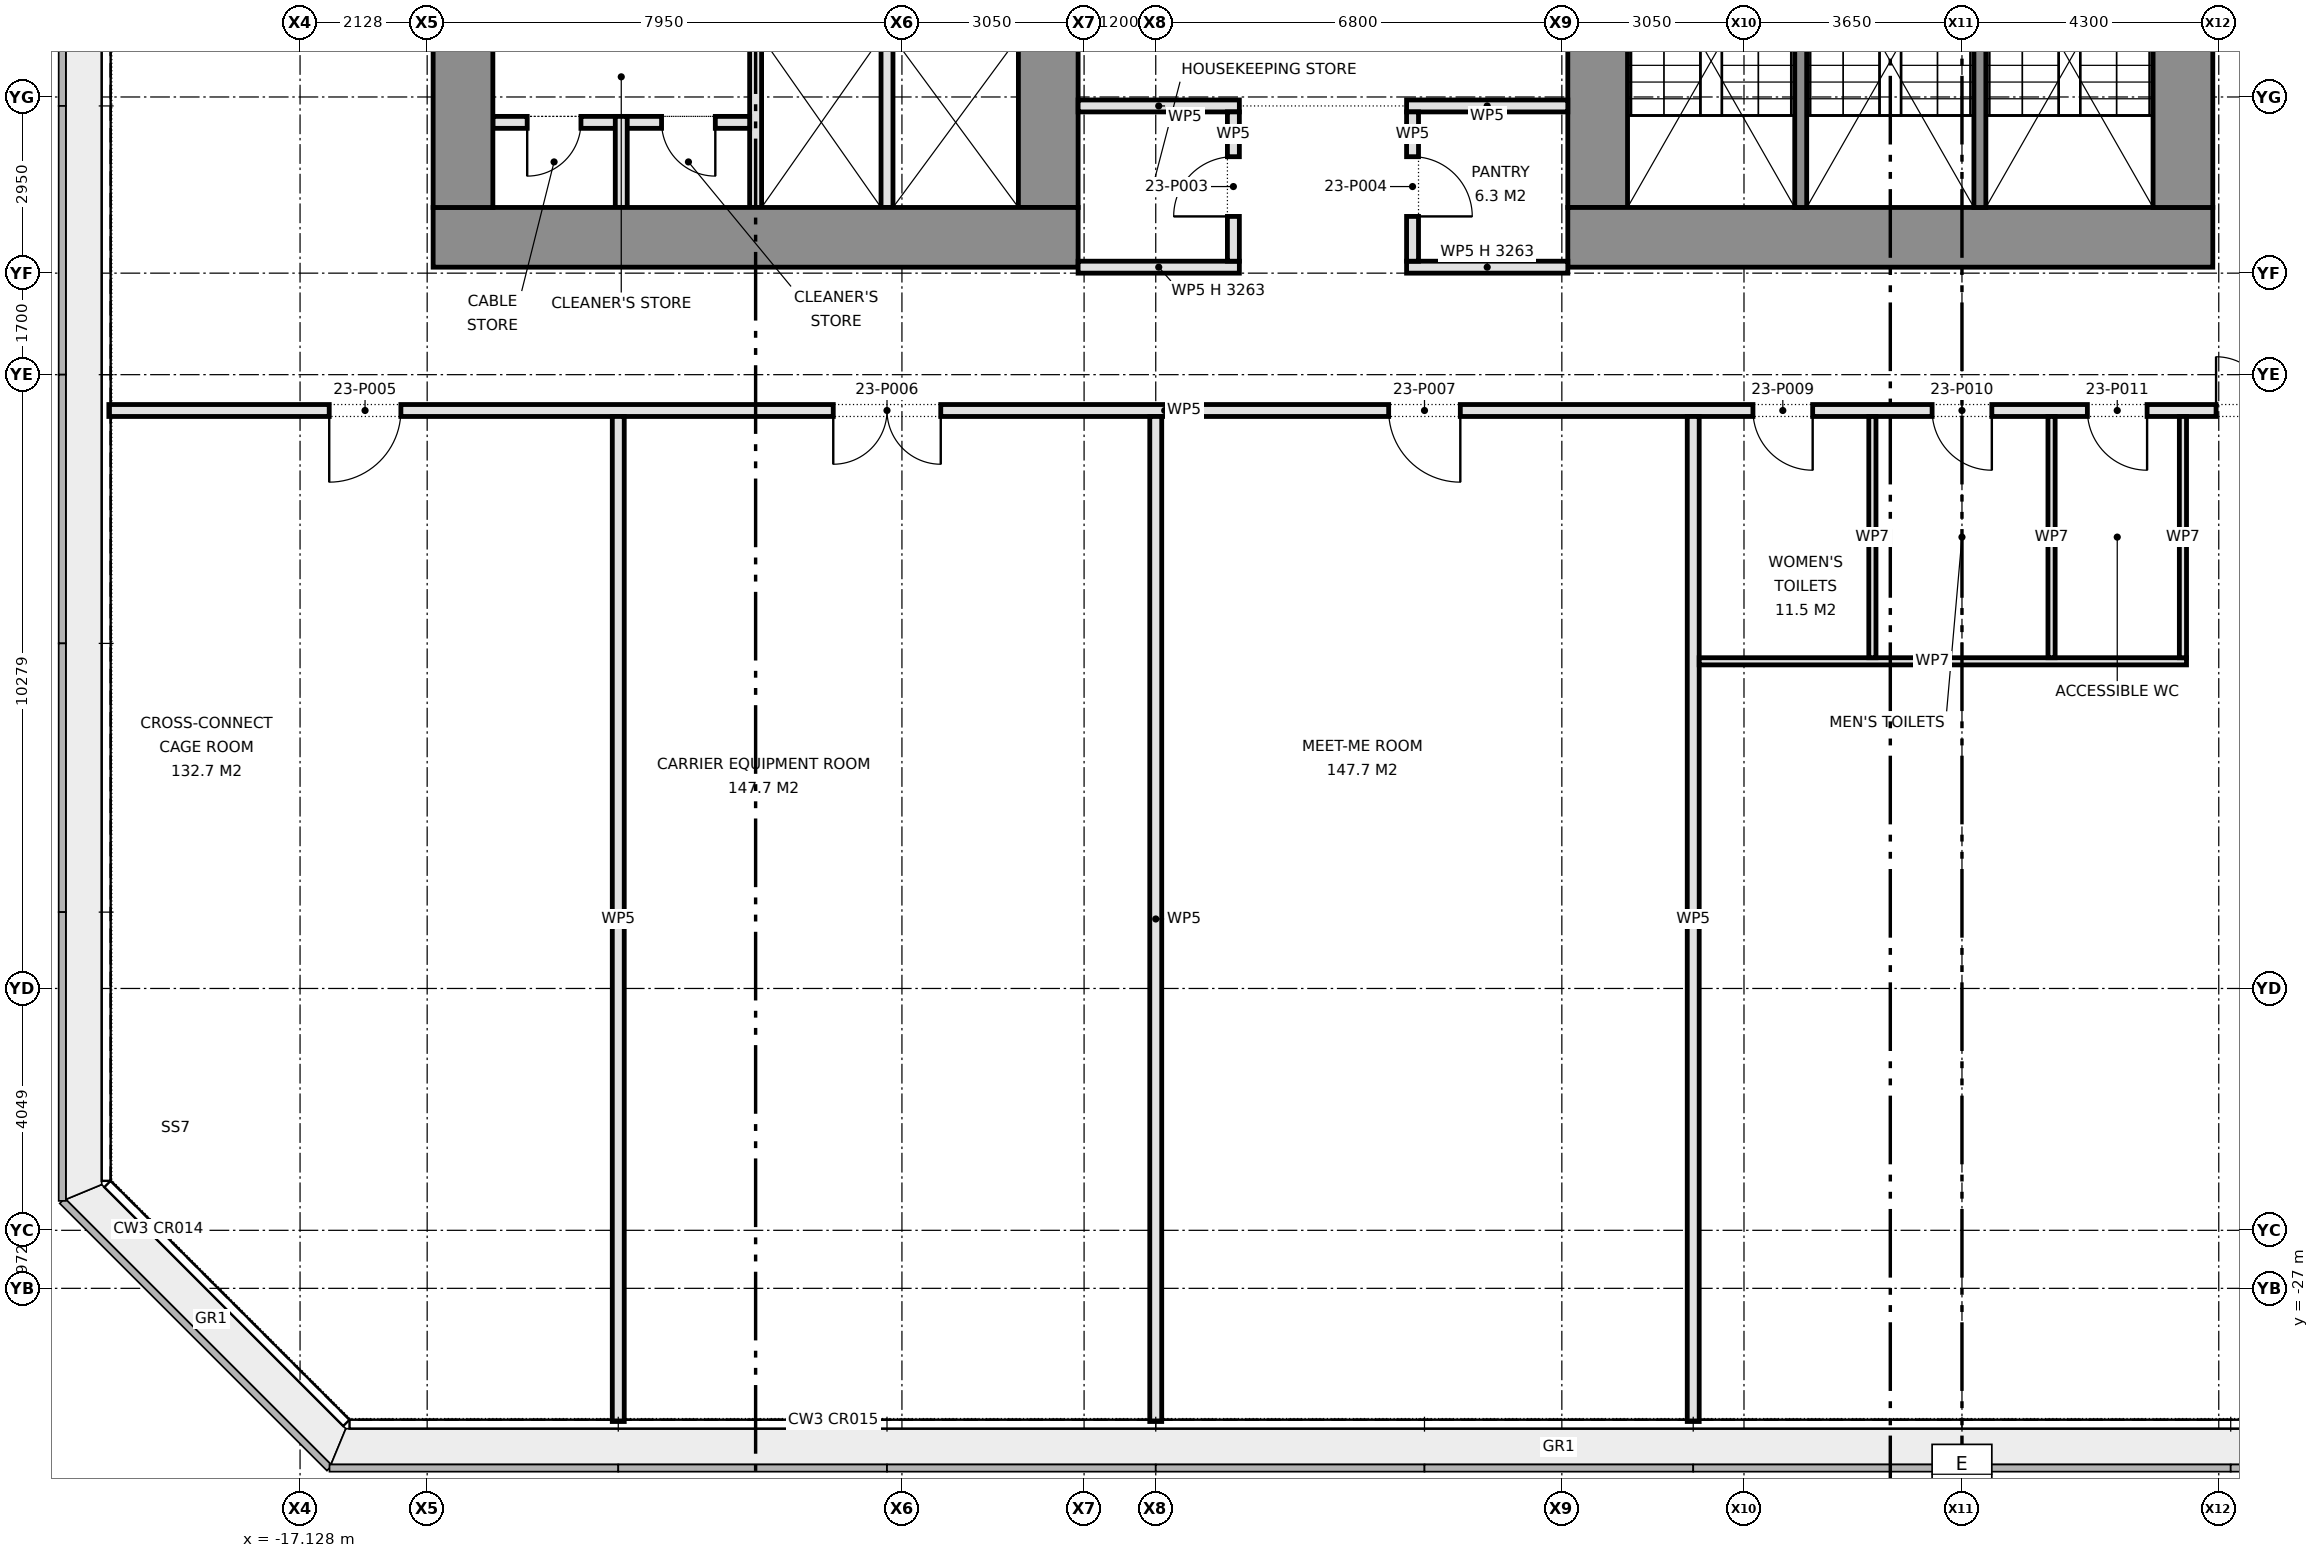
"""IFC4 building model, lengths in metres.
Left out: names, types, materials, properties, quantities, classifications, styles, units other than length and angle.
Written with IfcOpenShell. Run it as: python <this file> out.ifc"""

import sys

from ifc_helpers import new_model, si_unit, direction, frame, frame_2d, origin, place, context, subcontext, project, spatial, rectangle, extrude, element, fill, save


model = new_model("IFC4")
c1 = context("Model", 3, precision=1e-05, world=origin(), true_north=direction((0.0, 1.0)))
c2 = subcontext(c1, "Body", "Model", "MODEL_VIEW")
j1 = project(units=[si_unit("LENGTHUNIT", "METRE"), si_unit("PLANEANGLEUNIT", "RADIAN")], contexts=[c1])
p1 = place(None, origin())
s1 = spatial("IfcSite", under=j1, at=p1, CompositionType="ELEMENT")
p2 = place(p1, origin())
s2 = spatial("IfcBuilding", under=s1, at=p2, CompositionType="ELEMENT")
p3 = place(p2, frame((0.0, 0.0, 104.0)))
s3 = spatial("IfcBuildingStorey", under=s2, at=p3, CompositionType="ELEMENT", Elevation=104.0)
p4 = place(p3, frame((-14.9, -9.4, 0.0), z_axis=(0.0, 0.0, 1.0), x_axis=(1.0, 0.0, 0.0)))
e1 = element("IfcWall", 1, at=p4, inside=s3, PredefinedType="SHEAR", context=c2, shape_type="SweptSolid", body=[
    extrude(rectangle(XDim=10.8, YDim=1.0, at=frame_2d((5.4, 0.0))), origin(), (0.0, 0.0, 1.0), 4.2),
])
for number, where, z_axis, x_axis in (
    (2, (-14.4, -8.9, 0.0), (0.0, 0.0, 1.0), (0.0, 1.0, 0.0)),
    (3, (-4.6, -8.9, 0.0), (0.0, 0.0, 1.0), (0.0, 1.0, 0.0)),
):
    element("IfcWall", number, at=place(p3, frame(where, z_axis=z_axis, x_axis=x_axis)), inside=s3, PredefinedType="SHEAR", context=c2, shape_type="SweptSolid", body=[
        extrude(rectangle(XDim=3.15, YDim=1.0, at=frame_2d((1.575, 0.0))), origin(), (0.0, 0.0, 1.0), 4.2),
    ])
for number, where, z_axis, x_axis in (
    (4, (-9.5, -8.9, 0.0), (0.0, 0.0, 1.0), (0.0, 1.0, 0.0)),
    (5, (-7.3, -8.9, 0.0), (0.0, 0.0, 1.0), (0.0, 1.0, 0.0)),
):
    element("IfcWall", number, at=place(p3, frame(where, z_axis=z_axis, x_axis=x_axis)), inside=s3, PredefinedType="PARTITIONING", context=c2, shape_type="SweptSolid", body=[
        extrude(rectangle(XDim=2.85, YDim=0.2, at=frame_2d((1.425, 0.0))), origin(), (0.0, 0.0, 1.0), 4.2),
    ])
p5 = place(p3, frame((-13.9, -7.475, 0.0), z_axis=(0.0, 0.0, 1.0), x_axis=(1.0, 0.0, 0.0)))
e6 = element("IfcWall", 6, at=p5, inside=s3, PredefinedType="PARTITIONING", context=c2, shape_type="SweptSolid", body=[
    extrude(rectangle(XDim=4.3, YDim=0.2, at=frame_2d((2.15, 0.0))), origin(), (0.0, 0.0, 1.0), 4.2),
])
p6 = place(p5, frame((0.575, 0.0, 0.0)))
e7 = element("IfcOpeningElement", 7, at=p6, cuts=e6, PredefinedType="OPENING", context=c2, shape_type="SweptSolid", body=[
    extrude(rectangle(XDim=0.9, YDim=2.1, at=frame_2d((0.45, 1.05))), frame((0.0, 0.11, 0.0), z_axis=(0.0, -1.0, 0.0), x_axis=(1.0, 0.0, 0.0)), (0.0, 0.0, 1.0), 0.22),
])
p7 = place(p5, frame((2.825, 0.0, 0.0)))
e8 = element("IfcOpeningElement", 8, at=p7, cuts=e6, PredefinedType="OPENING", context=c2, shape_type="SweptSolid", body=[
    extrude(rectangle(XDim=0.9, YDim=2.1, at=frame_2d((0.45, 1.05))), frame((0.0, 0.11, 0.0), z_axis=(0.0, -1.0, 0.0), x_axis=(1.0, 0.0, 0.0)), (0.0, 0.0, 1.0), 0.22),
])
p8 = place(p3, frame((-11.75, -8.9, 0.0), z_axis=(0.0, 0.0, 1.0), x_axis=(0.0, 1.0, 0.0)))
e9 = element("IfcWall", 9, at=p8, inside=s3, PredefinedType="PARTITIONING", context=c2, shape_type="SweptSolid", body=[
    extrude(rectangle(XDim=1.525, YDim=0.2, at=frame_2d((0.762, 0.0))), origin(), (0.0, 0.0, 1.0), 4.2),
])
p9 = place(p3, frame((14.9, -9.4, 0.0), z_axis=(0.0, 0.0, 1.0), x_axis=(-1.0, 0.0, 0.0)))
e10 = element("IfcWall", 10, at=p9, inside=s3, PredefinedType="SHEAR", context=c2, shape_type="SweptSolid", body=[
    extrude(rectangle(XDim=10.8, YDim=1.0, at=frame_2d((5.4, 0.0))), origin(), (0.0, 0.0, 1.0), 4.2),
])
p10 = place(p3, frame((14.4, -3.68, 0.0), z_axis=(0.0, 0.0, 1.0), x_axis=(0.0, -1.0, 0.0)))
e11 = element("IfcWall", 11, at=p10, inside=s3, PredefinedType="SHEAR", context=c2, shape_type="SweptSolid", body=[
    extrude(rectangle(XDim=5.22, YDim=1.0, at=frame_2d((2.61, 0.0))), origin(), (0.0, 0.0, 1.0), 4.2),
])
p11 = place(p3, frame((4.6, -1.55, 0.0), z_axis=(0.0, 0.0, 1.0), x_axis=(0.0, -1.0, 0.0)))
e12 = element("IfcWall", 12, at=p11, inside=s3, PredefinedType="SHEAR", context=c2, shape_type="SweptSolid", body=[
    extrude(rectangle(XDim=7.35, YDim=1.0, at=frame_2d((3.675, 0.0))), origin(), (0.0, 0.0, 1.0), 4.2),
])
for number, where, z_axis, x_axis in (
    (13, (11.0, -2.38, 0.0), (0.0, 0.0, 1.0), (0.0, -1.0, 0.0)),
    (14, (8.0, -2.38, 0.0), (0.0, 0.0, 1.0), (0.0, -1.0, 0.0)),
):
    element("IfcWall", number, at=place(p3, frame(where, z_axis=z_axis, x_axis=x_axis)), inside=s3, PredefinedType="SHEAR", context=c2, shape_type="SweptSolid", body=[
        extrude(rectangle(XDim=6.52, YDim=0.2, at=frame_2d((3.26, 0.0))), origin(), (0.0, 0.0, 1.0), 4.2),
    ])
p12 = place(p3, frame((-20.33, -12.3, 0.0), z_axis=(0.0, 0.0, 1.0), x_axis=(1.0, 0.0, 0.0)))
e15 = element("IfcWall", 15, at=p12, inside=s3, PredefinedType="PARTITIONING", context=c2, shape_type="SweptSolid", body=[
    extrude(rectangle(XDim=37.73, YDim=0.2, at=frame_2d((18.865, 0.0))), origin(), (0.0, 0.0, 1.0), 4.2),
])
p13 = place(p12, frame((3.69, 0.0, 0.0)))
e16 = element("IfcOpeningElement", 16, at=p13, cuts=e15, PredefinedType="OPENING", context=c2, shape_type="SweptSolid", body=[
    extrude(rectangle(XDim=1.2, YDim=2.1, at=frame_2d((0.6, 1.05))), frame((0.0, 0.11, 0.0), z_axis=(0.0, -1.0, 0.0), x_axis=(1.0, 0.0, 0.0)), (0.0, 0.0, 1.0), 0.22),
])
p14 = place(p12, frame((12.13, 0.0, 0.0)))
e17 = element("IfcOpeningElement", 17, at=p14, cuts=e15, PredefinedType="OPENING", context=c2, shape_type="SweptSolid", body=[
    extrude(rectangle(XDim=1.8, YDim=2.1, at=frame_2d((0.9, 1.05))), frame((0.0, 0.11, 0.0), z_axis=(0.0, -1.0, 0.0), x_axis=(1.0, 0.0, 0.0)), (0.0, 0.0, 1.0), 0.22),
])
p15 = place(p12, frame((21.43, 0.0, 0.0)))
e18 = element("IfcOpeningElement", 18, at=p15, cuts=e15, PredefinedType="OPENING", context=c2, shape_type="SweptSolid", body=[
    extrude(rectangle(XDim=1.2, YDim=2.1, at=frame_2d((0.6, 1.05))), frame((0.0, 0.11, 0.0), z_axis=(0.0, -1.0, 0.0), x_axis=(1.0, 0.0, 0.0)), (0.0, 0.0, 1.0), 0.22),
])
p16 = place(p12, frame((35.285, 0.0, 0.0)))
e19 = element("IfcOpeningElement", 19, at=p16, cuts=e15, PredefinedType="OPENING", context=c2, shape_type="SweptSolid", body=[
    extrude(rectangle(XDim=1.8, YDim=2.1, at=frame_2d((0.9, 1.05))), frame((0.0, 0.11, 0.0), z_axis=(0.0, -1.0, 0.0), x_axis=(1.0, 0.0, 0.0)), (0.0, 0.0, 1.0), 0.22),
])
p17 = place(p12, frame((27.53, 0.0, 0.0)))
e20 = element("IfcOpeningElement", 20, at=p17, cuts=e15, PredefinedType="OPENING", context=c2, shape_type="SweptSolid", body=[
    extrude(rectangle(XDim=1.0, YDim=2.1, at=frame_2d((0.5, 1.05))), frame((0.0, 0.11, 0.0), z_axis=(0.0, -1.0, 0.0), x_axis=(1.0, 0.0, 0.0)), (0.0, 0.0, 1.0), 0.22),
])
p18 = place(p12, frame((30.53, 0.0, 0.0)))
e21 = element("IfcOpeningElement", 21, at=p18, cuts=e15, PredefinedType="OPENING", context=c2, shape_type="SweptSolid", body=[
    extrude(rectangle(XDim=1.0, YDim=2.1, at=frame_2d((0.5, 1.05))), frame((0.0, 0.11, 0.0), z_axis=(0.0, -1.0, 0.0), x_axis=(1.0, 0.0, 0.0)), (0.0, 0.0, 1.0), 0.22),
])
p19 = place(p12, frame((33.13, 0.0, 0.0)))
e22 = element("IfcOpeningElement", 22, at=p19, cuts=e15, PredefinedType="OPENING", context=c2, shape_type="SweptSolid", body=[
    extrude(rectangle(XDim=1.0, YDim=2.1, at=frame_2d((0.5, 1.05))), frame((0.0, 0.11, 0.0), z_axis=(0.0, -1.0, 0.0), x_axis=(1.0, 0.0, 0.0)), (0.0, 0.0, 1.0), 0.22),
])
for number, where, z_axis, x_axis in (
    (23, (-4.1, -9.9, 0.0), (0.0, 0.0, 1.0), (1.0, 0.0, 0.0)),
    (24, (1.4, -9.9, 0.0), (0.0, 0.0, 1.0), (1.0, 0.0, 0.0)),
):
    element("IfcWall", number, at=place(p3, frame(where, z_axis=z_axis, x_axis=x_axis)), inside=s3, PredefinedType="PARTITIONING", context=c2, shape_type="SweptSolid", body=[
        extrude(rectangle(XDim=2.7, YDim=0.2, at=frame_2d((1.35, 0.0))), origin(), (0.0, 0.0, 1.0), 3.263),
    ])
for number, where, z_axis, x_axis in (
    (25, (-4.1, -7.2, 0.0), (0.0, 0.0, 1.0), (1.0, 0.0, 0.0)),
    (26, (1.4, -7.2, 0.0), (0.0, 0.0, 1.0), (1.0, 0.0, 0.0)),
):
    element("IfcWall", number, at=place(p3, frame(where, z_axis=z_axis, x_axis=x_axis)), inside=s3, PredefinedType="PARTITIONING", context=c2, shape_type="SweptSolid", body=[
        extrude(rectangle(XDim=2.7, YDim=0.2, at=frame_2d((1.35, 0.0))), origin(), (0.0, 0.0, 1.0), 4.2),
    ])
p20 = place(p3, frame((6.2, -29.23, 0.0), z_axis=(0.0, 0.0, 1.0), x_axis=(0.0, 1.0, 0.0)))
e27 = element("IfcWall", 27, at=p20, inside=s3, PredefinedType="PARTITIONING", context=c2, shape_type="SweptSolid", body=[
    extrude(rectangle(XDim=16.83, YDim=0.2, at=frame_2d((8.415, 0.0))), origin(), (0.0, 0.0, 1.0), 4.2),
])
p21 = place(p3, frame((1.5, -9.8, 0.0), z_axis=(0.0, 0.0, 1.0), x_axis=(0.0, 1.0, 0.0)))
e28 = element("IfcWall", 28, at=p21, inside=s3, PredefinedType="PARTITIONING", context=c2, shape_type="SweptSolid", body=[
    extrude(rectangle(XDim=2.5, YDim=0.2, at=frame_2d((1.25, 0.0))), origin(), (0.0, 0.0, 1.0), 4.2),
])
p22 = place(p21, frame((0.75, 0.0, 0.0)))
e29 = element("IfcOpeningElement", 29, at=p22, cuts=e28, PredefinedType="OPENING", context=c2, shape_type="SweptSolid", body=[
    extrude(rectangle(XDim=1.0, YDim=2.1, at=frame_2d((0.5, 1.05))), frame((0.0, 0.11, 0.0), z_axis=(0.0, -1.0, 0.0), x_axis=(1.0, 0.0, 0.0)), (0.0, 0.0, 1.0), 0.22),
])
p23 = place(p3, frame((-1.5, -9.8, 0.0), z_axis=(0.0, 0.0, 1.0), x_axis=(0.0, 1.0, 0.0)))
e30 = element("IfcWall", 30, at=p23, inside=s3, PredefinedType="PARTITIONING", context=c2, shape_type="SweptSolid", body=[
    extrude(rectangle(XDim=2.5, YDim=0.2, at=frame_2d((1.25, 0.0))), origin(), (0.0, 0.0, 1.0), 4.2),
])
p24 = place(p23, frame((0.75, 0.0, 0.0)))
e31 = element("IfcOpeningElement", 31, at=p24, cuts=e30, PredefinedType="OPENING", context=c2, shape_type="SweptSolid", body=[
    extrude(rectangle(XDim=1.0, YDim=2.1, at=frame_2d((0.5, 1.05))), frame((0.0, 0.11, 0.0), z_axis=(0.0, -1.0, 0.0), x_axis=(1.0, 0.0, 0.0)), (0.0, 0.0, 1.0), 0.22),
])
for number, where, z_axis, x_axis in (
    (32, (-2.8, -29.23, 0.0), (0.0, 0.0, 1.0), (0.0, 1.0, 0.0)),
    (33, (-11.8, -29.23, 0.0), (0.0, 0.0, 1.0), (0.0, 1.0, 0.0)),
):
    element("IfcWall", number, at=place(p3, frame(where, z_axis=z_axis, x_axis=x_axis)), inside=s3, PredefinedType="PARTITIONING", context=c2, shape_type="SweptSolid", body=[
        extrude(rectangle(XDim=16.83, YDim=0.2, at=frame_2d((8.415, 0.0))), origin(), (0.0, 0.0, 1.0), 4.2),
    ])
p25 = place(p3, frame((6.3, -16.5, 0.0), z_axis=(0.0, 0.0, 1.0), x_axis=(1.0, 0.0, 0.0)))
e34 = element("IfcWall", 34, at=p25, inside=s3, PredefinedType="PARTITIONING", context=c2, shape_type="SweptSolid", body=[
    extrude(rectangle(XDim=8.16, YDim=0.12, at=frame_2d((4.08, 0.0))), origin(), (0.0, 0.0, 1.0), 4.2),
])
for number, where, z_axis, x_axis in (
    (35, (14.4, -16.44, 0.0), (0.0, 0.0, 1.0), (0.0, 1.0, 0.0)),
    (36, (12.2, -16.44, 0.0), (0.0, 0.0, 1.0), (0.0, 1.0, 0.0)),
    (37, (9.2, -16.44, 0.0), (0.0, 0.0, 1.0), (0.0, 1.0, 0.0)),
):
    element("IfcWall", number, at=place(p3, frame(where, z_axis=z_axis, x_axis=x_axis)), inside=s3, PredefinedType="PARTITIONING", context=c2, shape_type="SweptSolid", body=[
        extrude(rectangle(XDim=4.04, YDim=0.12, at=frame_2d((2.02, 0.0))), origin(), (0.0, 0.0, 1.0), 4.2),
    ])
p26 = place(p6, frame((0.9, 0.0, 0.0), z_axis=(0.0, 0.0, 1.0), x_axis=(-1.0, 0.0, 0.0)))
e38 = element("IfcDoor", 38, at=p26, inside=s3, OperationType="SINGLE_SWING_RIGHT", PredefinedType="DOOR", context=c2, shape_type="SweptSolid", body=[
    extrude(rectangle(XDim=0.9, YDim=2.1, at=frame_2d((0.45, 1.05))), frame((0.0, 0.025, 0.0), z_axis=(0.0, -1.0, 0.0), x_axis=(1.0, 0.0, 0.0)), (0.0, 0.0, 1.0), 0.05),
])
fill(e7, e38)
p27 = place(p7, frame((0.9, 0.0, 0.0), z_axis=(0.0, 0.0, 1.0), x_axis=(-1.0, 0.0, 0.0)))
e39 = element("IfcDoor", 39, at=p27, inside=s3, OperationType="SINGLE_SWING_LEFT", PredefinedType="DOOR", context=c2, shape_type="SweptSolid", body=[
    extrude(rectangle(XDim=0.9, YDim=2.1, at=frame_2d((0.45, 1.05))), frame((0.0, 0.025, 0.0), z_axis=(0.0, -1.0, 0.0), x_axis=(1.0, 0.0, 0.0)), (0.0, 0.0, 1.0), 0.05),
])
fill(e8, e39)
p28 = place(p24, origin())
e40 = element("IfcDoor", 40, at=p28, inside=s3, OperationType="SINGLE_SWING_LEFT", PredefinedType="DOOR", context=c2, shape_type="SweptSolid", body=[
    extrude(rectangle(XDim=1.0, YDim=2.1, at=frame_2d((0.5, 1.05))), frame((0.0, 0.025, 0.0), z_axis=(0.0, -1.0, 0.0), x_axis=(1.0, 0.0, 0.0)), (0.0, 0.0, 1.0), 0.05),
])
fill(e31, e40)
p29 = place(p22, frame((1.0, 0.0, 0.0), z_axis=(0.0, 0.0, 1.0), x_axis=(-1.0, 0.0, 0.0)))
e41 = element("IfcDoor", 41, at=p29, inside=s3, OperationType="SINGLE_SWING_RIGHT", PredefinedType="DOOR", context=c2, shape_type="SweptSolid", body=[
    extrude(rectangle(XDim=1.0, YDim=2.1, at=frame_2d((0.5, 1.05))), frame((0.0, 0.025, 0.0), z_axis=(0.0, -1.0, 0.0), x_axis=(1.0, 0.0, 0.0)), (0.0, 0.0, 1.0), 0.05),
])
fill(e29, e41)
p30 = place(p13, frame((1.2, 0.0, 0.0), z_axis=(0.0, 0.0, 1.0), x_axis=(-1.0, 0.0, 0.0)))
e42 = element("IfcDoor", 42, at=p30, inside=s3, OperationType="SINGLE_SWING_RIGHT", PredefinedType="DOOR", context=c2, shape_type="SweptSolid", body=[
    extrude(rectangle(XDim=1.2, YDim=2.1, at=frame_2d((0.6, 1.05))), frame((0.0, 0.025, 0.0), z_axis=(0.0, -1.0, 0.0), x_axis=(1.0, 0.0, 0.0)), (0.0, 0.0, 1.0), 0.05),
])
fill(e16, e42)
p31 = place(p14, frame((1.8, 0.0, 0.0), z_axis=(0.0, 0.0, 1.0), x_axis=(-1.0, 0.0, 0.0)))
e43 = element("IfcDoor", 43, at=p31, inside=s3, OperationType="DOUBLE_DOOR_SINGLE_SWING", PredefinedType="DOOR", context=c2, shape_type="SweptSolid", body=[
    extrude(rectangle(XDim=1.8, YDim=2.1, at=frame_2d((0.9, 1.05))), frame((0.0, 0.025, 0.0), z_axis=(0.0, -1.0, 0.0), x_axis=(1.0, 0.0, 0.0)), (0.0, 0.0, 1.0), 0.05),
])
fill(e17, e43)
p32 = place(p15, frame((1.2, 0.0, 0.0), z_axis=(0.0, 0.0, 1.0), x_axis=(-1.0, 0.0, 0.0)))
e44 = element("IfcDoor", 44, at=p32, inside=s3, OperationType="SINGLE_SWING_LEFT", PredefinedType="DOOR", context=c2, shape_type="SweptSolid", body=[
    extrude(rectangle(XDim=1.2, YDim=2.1, at=frame_2d((0.6, 1.05))), frame((0.0, 0.025, 0.0), z_axis=(0.0, -1.0, 0.0), x_axis=(1.0, 0.0, 0.0)), (0.0, 0.0, 1.0), 0.05),
])
fill(e18, e44)
p33 = place(p16, origin())
e45 = element("IfcDoor", 45, at=p33, inside=s3, OperationType="DOUBLE_DOOR_SINGLE_SWING", PredefinedType="DOOR", context=c2, shape_type="SweptSolid", body=[
    extrude(rectangle(XDim=1.8, YDim=2.1, at=frame_2d((0.9, 1.05))), frame((0.0, 0.025, 0.0), z_axis=(0.0, -1.0, 0.0), x_axis=(1.0, 0.0, 0.0)), (0.0, 0.0, 1.0), 0.05),
])
fill(e19, e45)
p34 = place(p17, frame((1.0, 0.0, 0.0), z_axis=(0.0, 0.0, 1.0), x_axis=(-1.0, 0.0, 0.0)))
e46 = element("IfcDoor", 46, at=p34, inside=s3, OperationType="SINGLE_SWING_LEFT", PredefinedType="DOOR", context=c2, shape_type="SweptSolid", body=[
    extrude(rectangle(XDim=1.0, YDim=2.1, at=frame_2d((0.5, 1.05))), frame((0.0, 0.025, 0.0), z_axis=(0.0, -1.0, 0.0), x_axis=(1.0, 0.0, 0.0)), (0.0, 0.0, 1.0), 0.05),
])
fill(e20, e46)
p35 = place(p18, frame((1.0, 0.0, 0.0), z_axis=(0.0, 0.0, 1.0), x_axis=(-1.0, 0.0, 0.0)))
e47 = element("IfcDoor", 47, at=p35, inside=s3, OperationType="SINGLE_SWING_LEFT", PredefinedType="DOOR", context=c2, shape_type="SweptSolid", body=[
    extrude(rectangle(XDim=1.0, YDim=2.1, at=frame_2d((0.5, 1.05))), frame((0.0, 0.025, 0.0), z_axis=(0.0, -1.0, 0.0), x_axis=(1.0, 0.0, 0.0)), (0.0, 0.0, 1.0), 0.05),
])
fill(e21, e47)
p36 = place(p19, frame((1.0, 0.0, 0.0), z_axis=(0.0, 0.0, 1.0), x_axis=(-1.0, 0.0, 0.0)))
e48 = element("IfcDoor", 48, at=p36, inside=s3, OperationType="SINGLE_SWING_LEFT", PredefinedType="DOOR", context=c2, shape_type="SweptSolid", body=[
    extrude(rectangle(XDim=1.0, YDim=2.1, at=frame_2d((0.5, 1.05))), frame((0.0, 0.025, 0.0), z_axis=(0.0, -1.0, 0.0), x_axis=(1.0, 0.0, 0.0)), (0.0, 0.0, 1.0), 0.05),
])
fill(e22, e48)
save(model, sys.argv[1])
